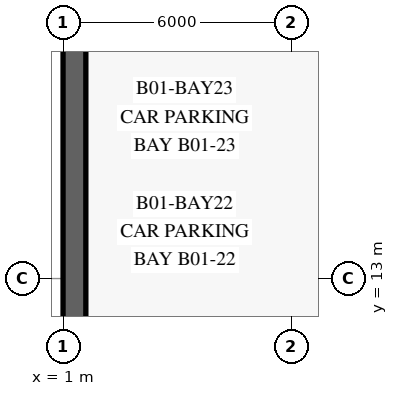
"""IFC4 building model, lengths in metres.
Left out: names, types, materials, properties, quantities, classifications, styles, units other than length and angle.
Written with IfcOpenShell. Run it as: python <this file> out.ifc"""

import sys

from ifc_helpers import new_model, si_unit, direction, frame, frame_2d, origin, place, context, subcontext, project, spatial, rectangle, extrude, element, save


model = new_model("IFC4")
c1 = context("Model", 3, precision=1e-05, world=origin(), true_north=direction((0.0, 1.0)))
c2 = subcontext(c1, "Body", "Model", "MODEL_VIEW")
j1 = project(units=[si_unit("LENGTHUNIT", "METRE"), si_unit("PLANEANGLEUNIT", "RADIAN")], contexts=[c1])
p1 = place(None, origin())
s1 = spatial("IfcSite", under=j1, at=p1, CompositionType="ELEMENT")
p2 = place(p1, origin())
s2 = spatial("IfcBuilding", under=s1, at=p2, CompositionType="ELEMENT")
p3 = place(p2, frame((0.0, 0.0, -4.2)))
s3 = spatial("IfcBuildingStorey", under=s2, at=p3, CompositionType="ELEMENT", Elevation=-4.2)
p4 = place(p3, frame((1.3, 48.4, 0.0), z_axis=(0.0, 0.0, 1.0), x_axis=(0.0, -1.0, 0.0)))
e1 = element("IfcWall", 1, at=p4, inside=s3, PredefinedType="USERDEFINED", context=c2, shape_type="SweptSolid", body=[
    extrude(rectangle(XDim=46.8, YDim=0.6, at=frame_2d((23.4, 0.0))), origin(), (0.0, 0.0, 1.0), 3.88),
])
save(model, sys.argv[1])
